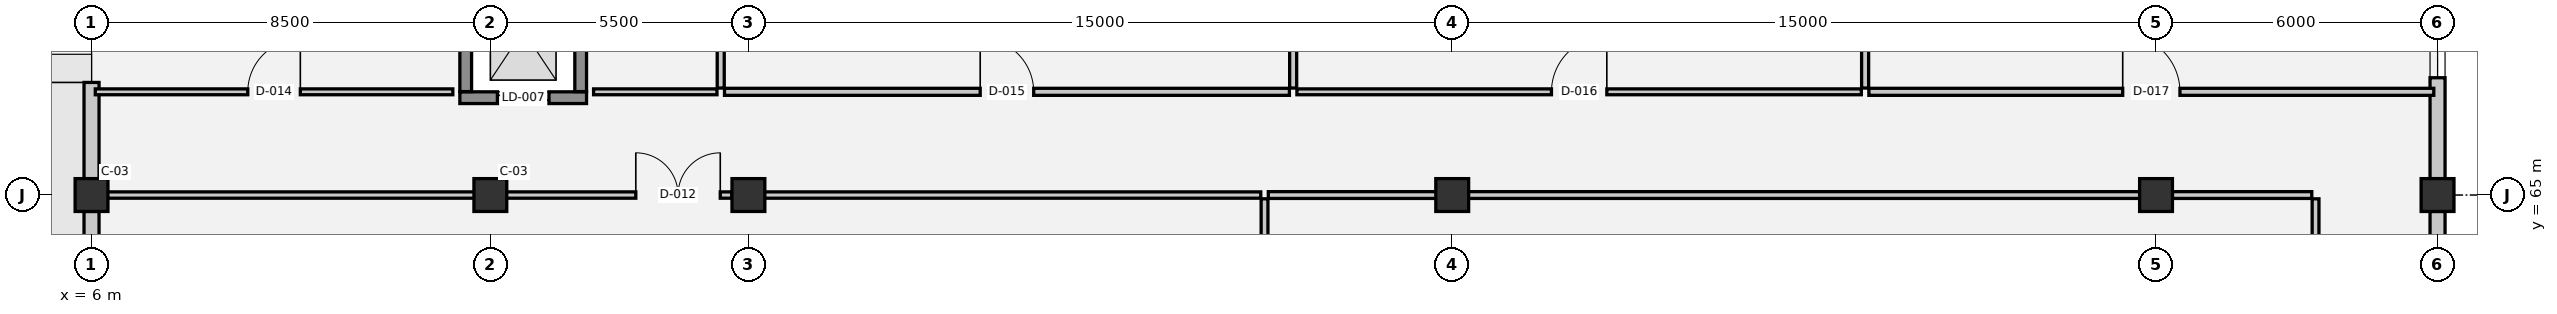
"""IFC4 building model, lengths in metres.
Left out: names, types, materials, properties, quantities, classifications, styles, units other than length and angle.
Written with IfcOpenShell. Run it as: python <this file> out.ifc"""

import sys

from ifc_helpers import new_model, si_unit, direction, frame, frame_2d, origin, origin_2d, place, context, subcontext, project, spatial, rectangle, extrude, element, fill, save


model = new_model("IFC4")
c1 = context("Model", 3, precision=1e-05, world=origin(), true_north=direction((0.0, 1.0)))
c2 = subcontext(c1, "Body", "Model", "MODEL_VIEW")
j1 = project(units=[si_unit("LENGTHUNIT", "METRE"), si_unit("PLANEANGLEUNIT", "RADIAN")], contexts=[c1])
p1 = place(None, origin())
s1 = spatial("IfcSite", under=j1, at=p1, CompositionType="ELEMENT")
p2 = place(p1, origin())
s2 = spatial("IfcBuilding", under=s1, at=p2, CompositionType="ELEMENT")
p3 = place(p2, origin())
s3 = spatial("IfcBuildingStorey", under=s2, at=p3, CompositionType="ELEMENT", Elevation=0.0)
for number, where, z_axis, x_axis in (
    (1, (6.0, 65.0, 0.0), (0.0, 0.0, 1.0), (1.0, 0.0, 0.0)),
    (2, (14.5, 65.0, 0.0), (0.0, 0.0, 1.0), (1.0, 0.0, 0.0)),
    (3, (20.0, 65.0, 0.0), (0.0, 0.0, 1.0), (1.0, 0.0, 0.0)),
    (4, (35.0, 65.0, 0.0), (0.0, 0.0, 1.0), (1.0, 0.0, 0.0)),
    (5, (50.0, 65.0, 0.0), (0.0, 0.0, 1.0), (1.0, 0.0, 0.0)),
    (6, (56.0, 65.0, 0.0), (0.0, 0.0, 1.0), (1.0, 0.0, 0.0)),
):
    element("IfcColumn", number, at=place(p3, frame(where, z_axis=z_axis, x_axis=x_axis)), inside=s3, PredefinedType="COLUMN", context=c2, shape_type="SweptSolid", body=[
        extrude(rectangle(XDim=0.7, YDim=0.7, at=origin_2d()), origin(), (0.0, 0.0, 1.0), 5.4),
    ])
p4 = place(p3, frame((6.0, 51.35, 0.0), z_axis=(0.0, 0.0, 1.0), x_axis=(0.0, 1.0, 0.0)))
e7 = element("IfcWall", 7, at=p4, inside=s3, PredefinedType="SOLIDWALL", context=c2, shape_type="SweptSolid", body=[
    extrude(rectangle(XDim=13.3, YDim=0.32, at=frame_2d((6.65, 0.0))), origin(), (0.0, 0.0, 1.0), 4.01),
])
p5 = place(p4, frame((5.45, 0.0, 0.0)))
e8 = element("IfcOpeningElement", 8, at=p5, cuts=e7, PredefinedType="OPENING", context=c2, shape_type="SweptSolid", body=[
    extrude(rectangle(XDim=2.4, YDim=2.4, at=frame_2d((1.2, 1.2))), frame((0.0, 0.17, 0.0), z_axis=(0.0, -1.0, 0.0), x_axis=(1.0, 0.0, 0.0)), (0.0, 0.0, 1.0), 0.34),
])
p6 = place(p3, frame((6.0, 65.35, 0.0), z_axis=(0.0, 0.0, 1.0), x_axis=(0.0, 1.0, 0.0)))
e9 = element("IfcWall", 9, at=p6, inside=s3, PredefinedType="SOLIDWALL", context=c2, shape_type="SweptSolid", body=[
    extrude(rectangle(XDim=6.3, YDim=0.32, at=frame_2d((3.15, 0.0))), origin(), (0.0, 0.0, 1.0), 4.01),
])
p7 = place(p6, frame((2.05, 0.0, 0.0)))
e10 = element("IfcOpeningElement", 10, at=p7, cuts=e9, PredefinedType="OPENING", context=c2, shape_type="SweptSolid", body=[
    extrude(rectangle(XDim=2.2, YDim=2.4, at=frame_2d((1.1, 1.2))), frame((0.0, 0.17, 0.0), z_axis=(0.0, -1.0, 0.0), x_axis=(1.0, 0.0, 0.0)), (0.0, 0.0, 1.0), 0.34),
])
p8 = place(p3, frame((56.0, 71.65, 0.0), z_axis=(0.0, 0.0, 1.0), x_axis=(0.0, -1.0, 0.0)))
e11 = element("IfcWall", 11, at=p8, inside=s3, PredefinedType="SOLIDWALL", context=c2, shape_type="SweptSolid", body=[
    extrude(rectangle(XDim=6.3, YDim=0.32, at=frame_2d((3.15, 0.0))), origin(), (0.0, 0.0, 1.0), 4.01),
])
p9 = place(p8, frame((2.15, 0.0, 0.9)))
e12 = element("IfcOpeningElement", 12, at=p9, cuts=e11, PredefinedType="OPENING", context=c2, shape_type="SweptSolid", body=[
    extrude(rectangle(XDim=2.0, YDim=2.2, at=frame_2d((1.0, 1.1))), frame((0.0, 0.17, 0.0), z_axis=(0.0, -1.0, 0.0), x_axis=(1.0, 0.0, 0.0)), (0.0, 0.0, 1.0), 0.34),
])
p10 = place(p3, frame((56.0, 64.65, 0.0), z_axis=(0.0, 0.0, 1.0), x_axis=(0.0, -1.0, 0.0)))
e13 = element("IfcWall", 13, at=p10, inside=s3, PredefinedType="SOLIDWALL", context=c2, shape_type="SweptSolid", body=[
    extrude(rectangle(XDim=13.3, YDim=0.32, at=frame_2d((6.65, 0.0))), origin(), (0.0, 0.0, 1.0), 4.01),
])
p11 = place(p10, frame((5.65, 0.0, 0.9)))
e14 = element("IfcOpeningElement", 14, at=p11, cuts=e13, PredefinedType="OPENING", context=c2, shape_type="SweptSolid", body=[
    extrude(rectangle(XDim=2.0, YDim=2.2, at=frame_2d((1.0, 1.1))), frame((0.0, 0.17, 0.0), z_axis=(0.0, -1.0, 0.0), x_axis=(1.0, 0.0, 0.0)), (0.0, 0.0, 1.0), 0.34),
])
p12 = place(p3, frame((13.85, 67.075, 0.0), z_axis=(0.0, 0.0, 1.0), x_axis=(1.0, 0.0, 0.0)))
e15 = element("IfcWall", 15, at=p12, inside=s3, PredefinedType="SHEAR", context=c2, shape_type="SweptSolid", body=[
    extrude(rectangle(XDim=2.7, YDim=0.25, at=frame_2d((1.35, 0.0))), origin(), (0.0, 0.0, 1.0), 5.4),
])
p13 = place(p12, frame((0.8, 0.0, 0.0)))
e16 = element("IfcOpeningElement", 16, at=p13, cuts=e15, PredefinedType="OPENING", context=c2, shape_type="SweptSolid", body=[
    extrude(rectangle(XDim=1.1, YDim=2.15, at=frame_2d((0.55, 1.075))), frame((0.0, 0.135, 0.0), z_axis=(0.0, -1.0, 0.0), x_axis=(1.0, 0.0, 0.0)), (0.0, 0.0, 1.0), 0.27),
])
for number, where, z_axis, x_axis in (
    (17, (13.975, 69.795, 0.0), (0.0, 0.0, 1.0), (0.0, -1.0, 0.0)),
    (18, (16.425, 67.205, 0.0), (0.0, 0.0, 1.0), (0.0, 1.0, 0.0)),
):
    element("IfcWall", number, at=place(p3, frame(where, z_axis=z_axis, x_axis=x_axis)), inside=s3, PredefinedType="SHEAR", context=c2, shape_type="SweptSolid", body=[
        extrude(rectangle(XDim=2.59, YDim=0.25, at=frame_2d((1.295, 0.0))), origin(), (0.0, 0.0, 1.0), 5.4),
    ])
p14 = place(p3, frame((6.08, 65.0, 0.0), z_axis=(0.0, 0.0, 1.0), x_axis=(1.0, 0.0, 0.0)))
e19 = element("IfcWall", 19, at=p14, inside=s3, PredefinedType="PARTITIONING", context=c2, shape_type="SweptSolid", body=[
    extrude(rectangle(XDim=13.57, YDim=0.135, at=frame_2d((6.785, 0.0))), origin(), (0.0, 0.0, 1.0), 4.43),
])
p15 = place(p14, frame((11.52, 0.0, 0.0)))
e20 = element("IfcOpeningElement", 20, at=p15, cuts=e19, PredefinedType="OPENING", context=c2, shape_type="SweptSolid", body=[
    extrude(rectangle(XDim=1.8, YDim=2.3, at=frame_2d((0.9, 1.15))), frame((0.0, 0.077, 0.0), z_axis=(0.0, -1.0, 0.0), x_axis=(1.0, 0.0, 0.0)), (0.0, 0.0, 1.0), 0.155),
])
p16 = place(p3, frame((19.65, 65.0, 0.0), z_axis=(0.0, 0.0, 1.0), x_axis=(1.0, 0.0, 0.0)))
e21 = element("IfcWall", 21, at=p16, inside=s3, PredefinedType="PARTITIONING", context=c2, shape_type="SweptSolid", body=[
    extrude(rectangle(XDim=11.27, YDim=0.135, at=frame_2d((5.635, 0.0))), origin(), (0.0, 0.0, 1.0), 4.18),
])
p17 = place(p3, frame((31.08, 65.0, 0.0), z_axis=(0.0, 0.0, 1.0), x_axis=(1.0, 0.0, 0.0)))
e22 = element("IfcWall", 22, at=p17, inside=s3, PredefinedType="PARTITIONING", context=c2, shape_type="SweptSolid", body=[
    extrude(rectangle(XDim=19.27, YDim=0.145, at=frame_2d((9.635, 0.0))), origin(), (0.0, 0.0, 1.0), 4.18),
])
p18 = place(p3, frame((50.35, 65.0, 0.0), z_axis=(0.0, 0.0, 1.0), x_axis=(1.0, 0.0, 0.0)))
e23 = element("IfcWall", 23, at=p18, inside=s3, PredefinedType="PARTITIONING", context=c2, shape_type="SweptSolid", body=[
    extrude(rectangle(XDim=2.97, YDim=0.145, at=frame_2d((1.485, 0.0))), origin(), (0.0, 0.0, 1.0), 4.43),
])
p19 = place(p3, frame((6.08, 67.2, 0.0), z_axis=(0.0, 0.0, 1.0), x_axis=(1.0, 0.0, 0.0)))
e24 = element("IfcWall", 24, at=p19, inside=s3, PredefinedType="PARTITIONING", context=c2, shape_type="SweptSolid", body=[
    extrude(rectangle(XDim=7.62, YDim=0.125, at=frame_2d((3.81, 0.0))), origin(), (0.0, 0.0, 1.0), 5.04),
])
p20 = place(p19, frame((3.25, 0.0, 0.0)))
e25 = element("IfcOpeningElement", 25, at=p20, cuts=e24, PredefinedType="OPENING", context=c2, shape_type="SweptSolid", body=[
    extrude(rectangle(XDim=1.12, YDim=2.2, at=frame_2d((0.56, 1.1))), frame((0.0, 0.073, 0.0), z_axis=(0.0, -1.0, 0.0), x_axis=(1.0, 0.0, 0.0)), (0.0, 0.0, 1.0), 0.145),
])
p21 = place(p3, frame((16.7, 67.2, 0.0), z_axis=(0.0, 0.0, 1.0), x_axis=(1.0, 0.0, 0.0)))
e26 = element("IfcWall", 26, at=p21, inside=s3, PredefinedType="PARTITIONING", context=c2, shape_type="SweptSolid", body=[
    extrude(rectangle(XDim=2.63, YDim=0.125, at=frame_2d((1.315, 0.0))), origin(), (0.0, 0.0, 1.0), 5.04),
])
p22 = place(p3, frame((19.49, 67.2, 0.0), z_axis=(0.0, 0.0, 1.0), x_axis=(1.0, 0.0, 0.0)))
e27 = element("IfcWall", 27, at=p22, inside=s3, PredefinedType="PARTITIONING", context=c2, shape_type="SweptSolid", body=[
    extrude(rectangle(XDim=12.04, YDim=0.15, at=frame_2d((6.02, 0.0))), origin(), (0.0, 0.0, 1.0), 5.04),
])
p23 = place(p22, frame((5.45, 0.0, 0.0)))
e28 = element("IfcOpeningElement", 28, at=p23, cuts=e27, PredefinedType="OPENING", context=c2, shape_type="SweptSolid", body=[
    extrude(rectangle(XDim=1.14, YDim=2.2, at=frame_2d((0.57, 1.1))), frame((0.0, 0.085, 0.0), z_axis=(0.0, -1.0, 0.0), x_axis=(1.0, 0.0, 0.0)), (0.0, 0.0, 1.0), 0.17),
])
p24 = place(p3, frame((31.69, 67.2, 0.0), z_axis=(0.0, 0.0, 1.0), x_axis=(1.0, 0.0, 0.0)))
e29 = element("IfcWall", 29, at=p24, inside=s3, PredefinedType="PARTITIONING", context=c2, shape_type="SweptSolid", body=[
    extrude(rectangle(XDim=12.03, YDim=0.125, at=frame_2d((6.015, 0.0))), origin(), (0.0, 0.0, 1.0), 5.04),
])
p25 = place(p24, frame((5.425, 0.0, 0.0)))
e30 = element("IfcOpeningElement", 30, at=p25, cuts=e29, PredefinedType="OPENING", context=c2, shape_type="SweptSolid", body=[
    extrude(rectangle(XDim=1.18, YDim=2.2, at=frame_2d((0.59, 1.1))), frame((0.0, 0.073, 0.0), z_axis=(0.0, -1.0, 0.0), x_axis=(1.0, 0.0, 0.0)), (0.0, 0.0, 1.0), 0.145),
])
p26 = place(p3, frame((43.88, 67.2, 0.0), z_axis=(0.0, 0.0, 1.0), x_axis=(1.0, 0.0, 0.0)))
e31 = element("IfcWall", 31, at=p26, inside=s3, PredefinedType="PARTITIONING", context=c2, shape_type="SweptSolid", body=[
    extrude(rectangle(XDim=12.04, YDim=0.15, at=frame_2d((6.02, 0.0))), origin(), (0.0, 0.0, 1.0), 5.04),
])
p27 = place(p26, frame((5.41, 0.0, 0.0)))
e32 = element("IfcOpeningElement", 32, at=p27, cuts=e31, PredefinedType="OPENING", context=c2, shape_type="SweptSolid", body=[
    extrude(rectangle(XDim=1.22, YDim=2.2, at=frame_2d((0.61, 1.1))), frame((0.0, 0.085, 0.0), z_axis=(0.0, -1.0, 0.0), x_axis=(1.0, 0.0, 0.0)), (0.0, 0.0, 1.0), 0.17),
])
p28 = place(p3, frame((19.41, 67.28, 0.0), z_axis=(0.0, 0.0, 1.0), x_axis=(0.0, 1.0, 0.0)))
e33 = element("IfcWall", 33, at=p28, inside=s3, PredefinedType="PARTITIONING", context=c2, shape_type="SweptSolid", body=[
    extrude(rectangle(XDim=4.64, YDim=0.15, at=frame_2d((2.32, 0.0))), origin(), (0.0, 0.0, 1.0), 5.04),
])
p29 = place(p3, frame((31.0, 51.08, 0.0), z_axis=(0.0, 0.0, 1.0), x_axis=(0.0, 1.0, 0.0)))
e34 = element("IfcWall", 34, at=p29, inside=s3, PredefinedType="PARTITIONING", context=c2, shape_type="SweptSolid", body=[
    extrude(rectangle(XDim=13.84, YDim=0.145, at=frame_2d((6.92, 0.0))), origin(), (0.0, 0.0, 1.0), 5.04),
])
for number, where, z_axis, x_axis in (
    (35, (31.61, 67.28, 0.0), (0.0, 0.0, 1.0), (0.0, 1.0, 0.0)),
    (36, (43.8, 67.28, 0.0), (0.0, 0.0, 1.0), (0.0, 1.0, 0.0)),
):
    element("IfcWall", number, at=place(p3, frame(where, z_axis=z_axis, x_axis=x_axis)), inside=s3, PredefinedType="PARTITIONING", context=c2, shape_type="SweptSolid", body=[
        extrude(rectangle(XDim=4.64, YDim=0.15, at=frame_2d((2.32, 0.0))), origin(), (0.0, 0.0, 1.0), 5.04),
    ])
p30 = place(p3, frame((53.4, 51.08, 0.0), z_axis=(0.0, 0.0, 1.0), x_axis=(0.0, 1.0, 0.0)))
e37 = element("IfcWall", 37, at=p30, inside=s3, PredefinedType="PARTITIONING", context=c2, shape_type="SweptSolid", body=[
    extrude(rectangle(XDim=13.84, YDim=0.145, at=frame_2d((6.92, 0.0))), origin(), (0.0, 0.0, 1.0), 5.04),
])
p31 = place(p7, origin())
e38 = element("IfcDoor", 38, at=p31, inside=s3, OperationType="DOUBLE_DOOR_SINGLE_SWING", PredefinedType="DOOR", context=c2, shape_type="SweptSolid", body=[
    extrude(rectangle(XDim=2.2, YDim=2.4, at=frame_2d((1.1, 1.2))), frame((0.0, 0.025, 0.0), z_axis=(0.0, -1.0, 0.0), x_axis=(1.0, 0.0, 0.0)), (0.0, 0.0, 1.0), 0.05),
])
fill(e10, e38)
p32 = place(p9, origin())
e39 = element("IfcWindow", 39, at=p32, inside=s3, PartitioningType="SINGLE_PANEL", PredefinedType="WINDOW", context=c2, shape_type="SweptSolid", body=[
    extrude(rectangle(XDim=2.0, YDim=2.2, at=frame_2d((1.0, 1.1))), frame((0.0, 0.03, 0.0), z_axis=(0.0, -1.0, 0.0), x_axis=(1.0, 0.0, 0.0)), (0.0, 0.0, 1.0), 0.06),
])
fill(e12, e39)
p33 = place(p13, origin())
e40 = element("IfcDoor", 40, at=p33, inside=s3, OperationType="DOUBLE_DOOR_SLIDING", PredefinedType="DOOR", context=c2, shape_type="SweptSolid", body=[
    extrude(rectangle(XDim=1.1, YDim=2.15, at=frame_2d((0.55, 1.075))), frame((0.0, 0.025, 0.0), z_axis=(0.0, -1.0, 0.0), x_axis=(1.0, 0.0, 0.0)), (0.0, 0.0, 1.0), 0.05),
])
fill(e16, e40)
p34 = place(p15, origin())
e41 = element("IfcDoor", 41, at=p34, inside=s3, OperationType="DOUBLE_DOOR_SINGLE_SWING", PredefinedType="DOOR", context=c2, shape_type="SweptSolid", body=[
    extrude(rectangle(XDim=1.8, YDim=2.3, at=frame_2d((0.9, 1.15))), frame((0.0, 0.025, 0.0), z_axis=(0.0, -1.0, 0.0), x_axis=(1.0, 0.0, 0.0)), (0.0, 0.0, 1.0), 0.05),
])
fill(e20, e41)
p35 = place(p20, origin())
e42 = element("IfcDoor", 42, at=p35, inside=s3, OperationType="SINGLE_SWING_RIGHT", PredefinedType="DOOR", context=c2, shape_type="SweptSolid", body=[
    extrude(rectangle(XDim=1.12, YDim=2.2, at=frame_2d((0.56, 1.1))), frame((0.0, 0.025, 0.0), z_axis=(0.0, -1.0, 0.0), x_axis=(1.0, 0.0, 0.0)), (0.0, 0.0, 1.0), 0.05),
])
fill(e25, e42)
p36 = place(p23, origin())
e43 = element("IfcDoor", 43, at=p36, inside=s3, OperationType="SINGLE_SWING_LEFT", PredefinedType="DOOR", context=c2, shape_type="SweptSolid", body=[
    extrude(rectangle(XDim=1.14, YDim=2.2, at=frame_2d((0.57, 1.1))), frame((0.0, 0.025, 0.0), z_axis=(0.0, -1.0, 0.0), x_axis=(1.0, 0.0, 0.0)), (0.0, 0.0, 1.0), 0.05),
])
fill(e28, e43)
p37 = place(p25, origin())
e44 = element("IfcDoor", 44, at=p37, inside=s3, OperationType="SINGLE_SWING_RIGHT", PredefinedType="DOOR", context=c2, shape_type="SweptSolid", body=[
    extrude(rectangle(XDim=1.18, YDim=2.2, at=frame_2d((0.59, 1.1))), frame((0.0, 0.025, 0.0), z_axis=(0.0, -1.0, 0.0), x_axis=(1.0, 0.0, 0.0)), (0.0, 0.0, 1.0), 0.05),
])
fill(e30, e44)
p38 = place(p27, origin())
e45 = element("IfcDoor", 45, at=p38, inside=s3, OperationType="SINGLE_SWING_LEFT", PredefinedType="DOOR", context=c2, shape_type="SweptSolid", body=[
    extrude(rectangle(XDim=1.22, YDim=2.2, at=frame_2d((0.61, 1.1))), frame((0.0, 0.025, 0.0), z_axis=(0.0, -1.0, 0.0), x_axis=(1.0, 0.0, 0.0)), (0.0, 0.0, 1.0), 0.05),
])
fill(e32, e45)
save(model, sys.argv[1])
